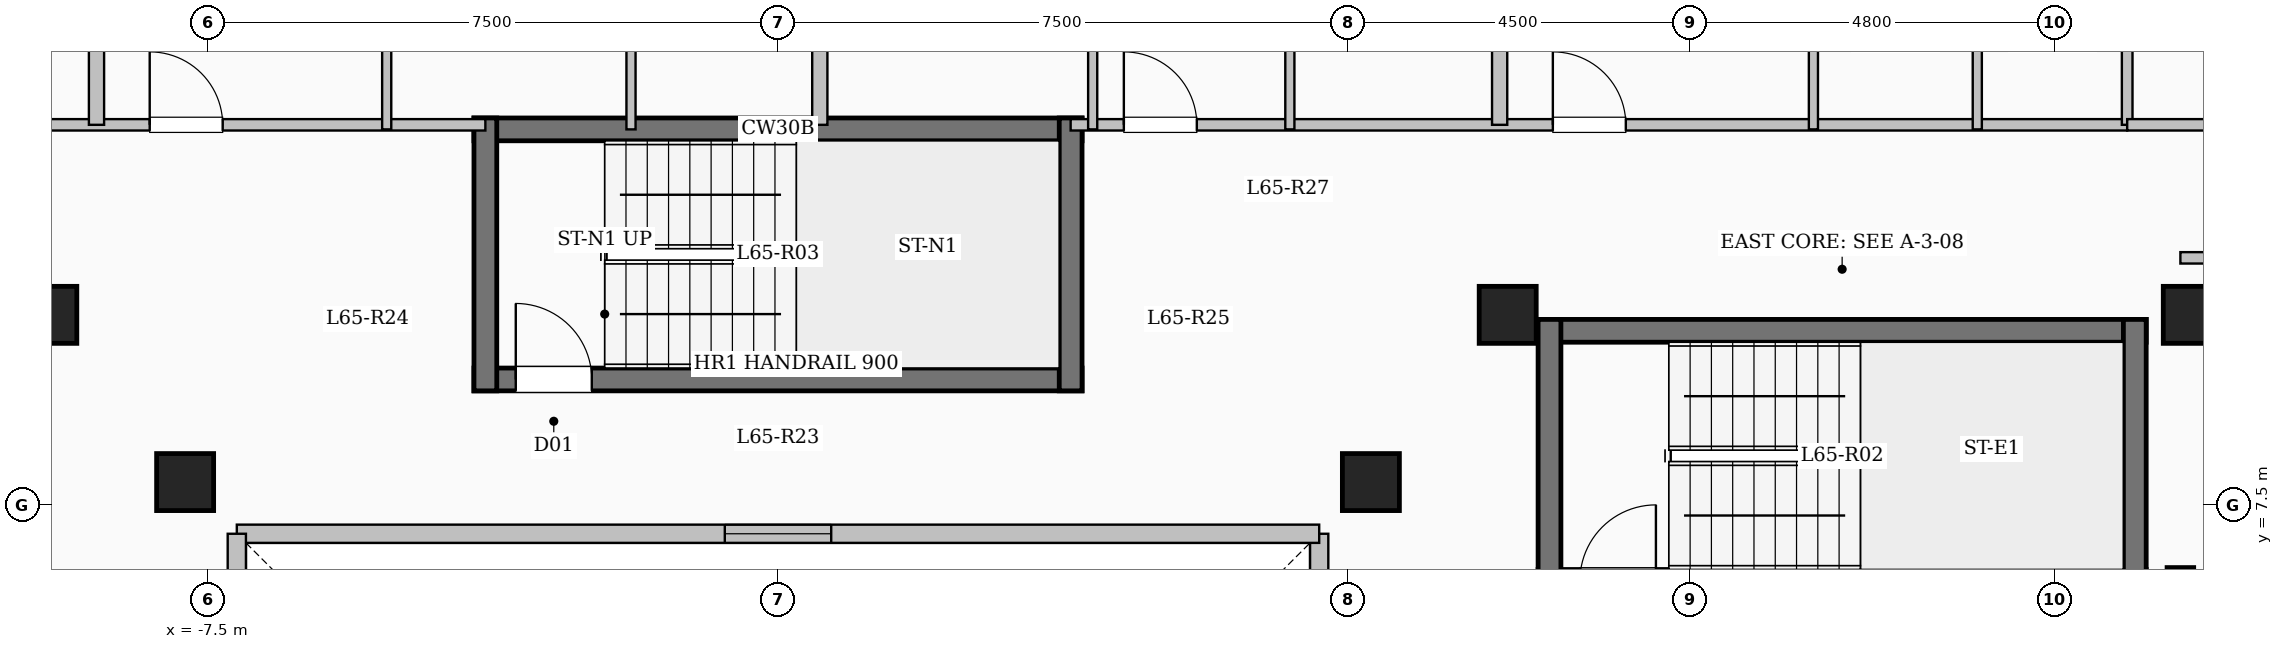
"""IFC4 building model, lengths in metres.
Left out: names, types, materials, properties, quantities, classifications, styles, units other than length and angle.
Written with IfcOpenShell. Run it as: python <this file> out.ifc"""

import sys

from ifc_helpers import new_model, si_unit, direction, frame, frame_2d, origin, origin_2d, place, context, subcontext, project, spatial, rectangle, extrude, element, fill, save


model = new_model("IFC4")
c1 = context("Model", 3, precision=1e-05, world=origin(), true_north=direction((0.0, 1.0)))
c2 = subcontext(c1, "Body", "Model", "MODEL_VIEW")
j1 = project(units=[si_unit("LENGTHUNIT", "METRE"), si_unit("PLANEANGLEUNIT", "RADIAN")], contexts=[c1])
p1 = place(None, origin())
s1 = spatial("IfcSite", under=j1, at=p1, CompositionType="ELEMENT")
p2 = place(p1, origin())
s2 = spatial("IfcBuilding", under=s1, at=p2, CompositionType="ELEMENT")
p3 = place(p2, frame((0.0, 0.0, 241.5)))
s3 = spatial("IfcBuildingStorey", under=s2, at=p3, CompositionType="ELEMENT", Elevation=241.5)
for number, where, z_axis, x_axis in (
    (1, (-7.8, 7.8, 0.0), (0.0, 0.0, 1.0), (1.0, 0.0, 0.0)),
    (2, (7.8, 7.8, 0.0), (0.0, 0.0, 1.0), (1.0, 0.0, 0.0)),
    (3, (-9.6, 10.0, 0.0), (0.0, 0.0, 1.0), (1.0, 0.0, 0.0)),
    (4, (9.6, 10.0, 0.0), (0.0, 0.0, 1.0), (1.0, 0.0, 0.0)),
    (5, (18.6, 10.0, 0.0), (0.0, 0.0, 1.0), (1.0, 0.0, 0.0)),
):
    element("IfcColumn", number, at=place(p3, frame(where, z_axis=z_axis, x_axis=x_axis)), inside=s3, PredefinedType="COLUMN", context=c2, shape_type="SweptSolid", body=[
        extrude(rectangle(XDim=0.75, YDim=0.75, at=origin_2d()), origin(), (0.0, 0.0, 1.0), 3.35),
    ])
p4 = place(p3, frame((7.12, -7.12, 0.0), z_axis=(0.0, 0.0, 1.0), x_axis=(0.0, 1.0, 0.0)))
e6 = element("IfcWall", 6, at=p4, inside=s3, PredefinedType="SOLIDWALL", context=c2, shape_type="SweptSolid", body=[
    extrude(rectangle(XDim=14.24, YDim=0.24, at=frame_2d((7.12, 0.0))), origin(), (0.0, 0.0, 1.0), 3.1),
])
p5 = place(p4, frame((6.42, 0.0, 0.95)))
e7 = element("IfcOpeningElement", 7, at=p5, cuts=e6, PredefinedType="OPENING", context=c2, shape_type="SweptSolid", body=[
    extrude(rectangle(XDim=1.4, YDim=1.5, at=frame_2d((0.7, 0.75))), frame((0.0, 0.13, 0.0), z_axis=(0.0, -1.0, 0.0), x_axis=(1.0, 0.0, 0.0)), (0.0, 0.0, 1.0), 0.26),
])
p6 = place(p3, frame((7.12, 7.12, 0.0), z_axis=(0.0, 0.0, 1.0), x_axis=(-1.0, 0.0, 0.0)))
e8 = element("IfcWall", 8, at=p6, inside=s3, PredefinedType="SOLIDWALL", context=c2, shape_type="SweptSolid", body=[
    extrude(rectangle(XDim=14.24, YDim=0.24, at=frame_2d((7.12, 0.0))), origin(), (0.0, 0.0, 1.0), 3.1),
])
p7 = place(p6, frame((6.42, 0.0, 0.95)))
e9 = element("IfcOpeningElement", 9, at=p7, cuts=e8, PredefinedType="OPENING", context=c2, shape_type="SweptSolid", body=[
    extrude(rectangle(XDim=1.4, YDim=1.5, at=frame_2d((0.7, 0.75))), frame((0.0, 0.13, 0.0), z_axis=(0.0, -1.0, 0.0), x_axis=(1.0, 0.0, 0.0)), (0.0, 0.0, 1.0), 0.26),
])
p8 = place(p3, frame((-7.12, 7.12, 0.0), z_axis=(0.0, 0.0, 1.0), x_axis=(0.0, -1.0, 0.0)))
e10 = element("IfcWall", 10, at=p8, inside=s3, PredefinedType="SOLIDWALL", context=c2, shape_type="SweptSolid", body=[
    extrude(rectangle(XDim=14.24, YDim=0.24, at=frame_2d((7.12, 0.0))), origin(), (0.0, 0.0, 1.0), 3.1),
])
p9 = place(p8, frame((6.42, 0.0, 0.95)))
e11 = element("IfcOpeningElement", 11, at=p9, cuts=e10, PredefinedType="OPENING", context=c2, shape_type="SweptSolid", body=[
    extrude(rectangle(XDim=1.4, YDim=1.5, at=frame_2d((0.7, 0.75))), frame((0.0, 0.13, 0.0), z_axis=(0.0, -1.0, 0.0), x_axis=(1.0, 0.0, 0.0)), (0.0, 0.0, 1.0), 0.26),
])
p10 = place(p3, frame((10.0, 9.79, 0.0), z_axis=(0.0, 0.0, 1.0), x_axis=(1.0, 0.0, 0.0)))
e12 = element("IfcWall", 12, at=p10, inside=s3, PredefinedType="SHEAR", context=c2, shape_type="SweptSolid", body=[
    extrude(rectangle(XDim=8.0, YDim=0.3, at=frame_2d((4.0, 0.0))), origin(), (0.0, 0.0, 1.0), 3.35),
])
p11 = place(p3, frame((10.0, 6.5, 0.0), z_axis=(0.0, 0.0, 1.0), x_axis=(1.0, 0.0, 0.0)))
e13 = element("IfcWall", 13, at=p11, inside=s3, PredefinedType="SHEAR", context=c2, shape_type="SweptSolid", body=[
    extrude(rectangle(XDim=8.0, YDim=0.3, at=frame_2d((4.0, 0.0))), origin(), (0.0, 0.0, 1.0), 3.35),
])
p12 = place(p11, frame((0.55, 0.0, 0.0)))
e14 = element("IfcOpeningElement", 14, at=p12, cuts=e13, PredefinedType="OPENING", context=c2, shape_type="SweptSolid", body=[
    extrude(rectangle(XDim=1.0, YDim=2.15, at=frame_2d((0.5, 1.075))), frame((0.0, 0.16, 0.0), z_axis=(0.0, -1.0, 0.0), x_axis=(1.0, 0.0, 0.0)), (0.0, 0.0, 1.0), 0.32),
])
for number, where, z_axis, x_axis in (
    (15, (10.15, 6.35, 0.0), (0.0, 0.0, 1.0), (0.0, 1.0, 0.0)),
    (16, (17.85, 6.35, 0.0), (0.0, 0.0, 1.0), (0.0, 1.0, 0.0)),
):
    element("IfcWall", number, at=place(p3, frame(where, z_axis=z_axis, x_axis=x_axis)), inside=s3, PredefinedType="SHEAR", context=c2, shape_type="SweptSolid", body=[
        extrude(rectangle(XDim=3.59, YDim=0.3, at=frame_2d((1.795, 0.0))), origin(), (0.0, 0.0, 1.0), 3.35),
    ])
p13 = place(p3, frame((-4.0, 12.44, 0.0), z_axis=(0.0, 0.0, 1.0), x_axis=(1.0, 0.0, 0.0)))
e17 = element("IfcWall", 17, at=p13, inside=s3, PredefinedType="SHEAR", context=c2, shape_type="SweptSolid", body=[
    extrude(rectangle(XDim=8.0, YDim=0.3, at=frame_2d((4.0, 0.0))), origin(), (0.0, 0.0, 1.0), 3.35),
])
p14 = place(p3, frame((-4.0, 9.15, 0.0), z_axis=(0.0, 0.0, 1.0), x_axis=(1.0, 0.0, 0.0)))
e18 = element("IfcWall", 18, at=p14, inside=s3, PredefinedType="SHEAR", context=c2, shape_type="SweptSolid", body=[
    extrude(rectangle(XDim=8.0, YDim=0.3, at=frame_2d((4.0, 0.0))), origin(), (0.0, 0.0, 1.0), 3.35),
])
p15 = place(p14, frame((0.55, 0.0, 0.0)))
e19 = element("IfcOpeningElement", 19, at=p15, cuts=e18, PredefinedType="OPENING", context=c2, shape_type="SweptSolid", body=[
    extrude(rectangle(XDim=1.0, YDim=2.15, at=frame_2d((0.5, 1.075))), frame((0.0, 0.16, 0.0), z_axis=(0.0, -1.0, 0.0), x_axis=(1.0, 0.0, 0.0)), (0.0, 0.0, 1.0), 0.32),
])
for number, where, z_axis, x_axis in (
    (20, (-3.85, 9.0, 0.0), (0.0, 0.0, 1.0), (0.0, 1.0, 0.0)),
    (21, (3.85, 9.0, 0.0), (0.0, 0.0, 1.0), (0.0, 1.0, 0.0)),
):
    element("IfcWall", number, at=place(p3, frame(where, z_axis=z_axis, x_axis=x_axis)), inside=s3, PredefinedType="SHEAR", context=c2, shape_type="SweptSolid", body=[
        extrude(rectangle(XDim=3.59, YDim=0.3, at=frame_2d((1.795, 0.0))), origin(), (0.0, 0.0, 1.0), 3.35),
    ])
p16 = place(p3, frame((18.45, -7.375, 0.0), z_axis=(0.0, 0.0, 1.0), x_axis=(0.0, 1.0, 0.0)))
e22 = element("IfcWall", 22, at=p16, inside=s3, PredefinedType="SHEAR", context=c2, shape_type="SweptSolid", body=[
    extrude(rectangle(XDim=14.05, YDim=0.35, at=frame_2d((7.025, 0.0))), origin(), (0.0, 0.0, 1.0), 3.35),
])
p17 = place(p3, frame((-17.75, 12.5, 0.0), z_axis=(0.0, 0.0, 1.0), x_axis=(1.0, 0.0, 0.0)))
e23 = element("IfcWall", 23, at=p17, inside=s3, PredefinedType="PARTITIONING", context=c2, shape_type="SweptSolid", body=[
    extrude(rectangle(XDim=13.9, YDim=0.15, at=frame_2d((6.95, 0.0))), origin(), (0.0, 0.0, 1.0), 3.1),
])
p18 = place(p17, frame((0.7, 0.0, 0.0)))
e24 = element("IfcOpeningElement", 24, at=p18, cuts=e23, PredefinedType="OPENING", context=c2, shape_type="SweptSolid", body=[
    extrude(rectangle(XDim=0.96, YDim=2.15, at=frame_2d((0.48, 1.075))), frame((0.0, 0.085, 0.0), z_axis=(0.0, -1.0, 0.0), x_axis=(1.0, 0.0, 0.0)), (0.0, 0.0, 1.0), 0.17),
])
p19 = place(p17, frame((9.484, 0.0, 0.0)))
e25 = element("IfcOpeningElement", 25, at=p19, cuts=e23, PredefinedType="OPENING", context=c2, shape_type="SweptSolid", body=[
    extrude(rectangle(XDim=0.96, YDim=2.15, at=frame_2d((0.48, 1.075))), frame((0.0, 0.085, 0.0), z_axis=(0.0, -1.0, 0.0), x_axis=(1.0, 0.0, 0.0)), (0.0, 0.0, 1.0), 0.17),
])
p20 = place(p3, frame((3.85, 12.5, 0.0), z_axis=(0.0, 0.0, 1.0), x_axis=(1.0, 0.0, 0.0)))
e26 = element("IfcWall", 26, at=p20, inside=s3, PredefinedType="PARTITIONING", context=c2, shape_type="SweptSolid", body=[
    extrude(rectangle(XDim=13.9, YDim=0.15, at=frame_2d((6.95, 0.0))), origin(), (0.0, 0.0, 1.0), 3.1),
])
p21 = place(p20, frame((0.7, 0.0, 0.0)))
e27 = element("IfcOpeningElement", 27, at=p21, cuts=e26, PredefinedType="OPENING", context=c2, shape_type="SweptSolid", body=[
    extrude(rectangle(XDim=0.96, YDim=2.15, at=frame_2d((0.48, 1.075))), frame((0.0, 0.085, 0.0), z_axis=(0.0, -1.0, 0.0), x_axis=(1.0, 0.0, 0.0)), (0.0, 0.0, 1.0), 0.17),
])
p22 = place(p20, frame((6.344, 0.0, 0.0)))
e28 = element("IfcOpeningElement", 28, at=p22, cuts=e26, PredefinedType="OPENING", context=c2, shape_type="SweptSolid", body=[
    extrude(rectangle(XDim=0.96, YDim=2.15, at=frame_2d((0.48, 1.075))), frame((0.0, 0.085, 0.0), z_axis=(0.0, -1.0, 0.0), x_axis=(1.0, 0.0, 0.0)), (0.0, 0.0, 1.0), 0.17),
])
p23 = place(p3, frame((0.55, 12.5, 0.0), z_axis=(0.0, 0.0, 1.0), x_axis=(0.0, 1.0, 0.0)))
e29 = element("IfcWall", 29, at=p23, inside=s3, PredefinedType="SOLIDWALL", context=c2, shape_type="SweptSolid", body=[
    extrude(rectangle(XDim=9.88, YDim=0.2, at=frame_2d((4.94, 0.0))), origin(), (0.0, 0.0, 1.0), 3.1),
])
p24 = place(p3, frame((-8.966, 12.5, 0.0), z_axis=(0.0, 0.0, 1.0), x_axis=(0.0, 1.0, 0.0)))
e30 = element("IfcWall", 30, at=p24, inside=s3, PredefinedType="SOLIDWALL", context=c2, shape_type="SweptSolid", body=[
    extrude(rectangle(XDim=8.902, YDim=0.2, at=frame_2d((4.451, 0.0))), origin(), (0.0, 0.0, 1.0), 3.1),
])
p25 = place(p3, frame((-5.148, 12.44, 0.0), z_axis=(0.0, 0.0, 1.0), x_axis=(0.0, 1.0, 0.0)))
e31 = element("IfcWall", 31, at=p25, inside=s3, PredefinedType="PARTITIONING", context=c2, shape_type="SweptSolid", body=[
    extrude(rectangle(XDim=9.903, YDim=0.12, at=frame_2d((4.952, 0.0))), origin(), (0.0, 0.0, 1.0), 3.1),
])
p26 = place(p25, frame((3.075, 0.0, 0.0)))
e32 = element("IfcOpeningElement", 32, at=p26, cuts=e31, PredefinedType="OPENING", context=c2, shape_type="SweptSolid", body=[
    extrude(rectangle(XDim=1.08, YDim=2.15, at=frame_2d((0.54, 1.075))), frame((0.0, 0.07, 0.0), z_axis=(0.0, -1.0, 0.0), x_axis=(1.0, 0.0, 0.0)), (0.0, 0.0, 1.0), 0.14),
])
p27 = place(p3, frame((-1.934, 12.44, 0.0), z_axis=(0.0, 0.0, 1.0), x_axis=(0.0, 1.0, 0.0)))
e33 = element("IfcWall", 33, at=p27, inside=s3, PredefinedType="PARTITIONING", context=c2, shape_type="SweptSolid", body=[
    extrude(rectangle(XDim=2.79, YDim=0.12, at=frame_2d((1.395, 0.0))), origin(), (0.0, 0.0, 1.0), 3.1),
])
p28 = place(p3, frame((9.494, 12.5, 0.0), z_axis=(0.0, 0.0, 1.0), x_axis=(0.0, 1.0, 0.0)))
e34 = element("IfcWall", 34, at=p28, inside=s3, PredefinedType="SOLIDWALL", context=c2, shape_type="SweptSolid", body=[
    extrude(rectangle(XDim=8.771, YDim=0.2, at=frame_2d((4.385, 0.0))), origin(), (0.0, 0.0, 1.0), 3.1),
])
p29 = place(p3, frame((4.14, 12.44, 0.0), z_axis=(0.0, 0.0, 1.0), x_axis=(0.0, 1.0, 0.0)))
e35 = element("IfcWall", 35, at=p29, inside=s3, PredefinedType="PARTITIONING", context=c2, shape_type="SweptSolid", body=[
    extrude(rectangle(XDim=9.94, YDim=0.12, at=frame_2d((4.97, 0.0))), origin(), (0.0, 0.0, 1.0), 3.1),
])
p30 = place(p29, frame((3.245, 0.0, 0.0)))
e36 = element("IfcOpeningElement", 36, at=p30, cuts=e35, PredefinedType="OPENING", context=c2, shape_type="SweptSolid", body=[
    extrude(rectangle(XDim=1.08, YDim=2.15, at=frame_2d((0.54, 1.075))), frame((0.0, 0.07, 0.0), z_axis=(0.0, -1.0, 0.0), x_axis=(1.0, 0.0, 0.0)), (0.0, 0.0, 1.0), 0.14),
])
p31 = place(p3, frame((6.734, 12.44, 0.0), z_axis=(0.0, 0.0, 1.0), x_axis=(0.0, 1.0, 0.0)))
e37 = element("IfcWall", 37, at=p31, inside=s3, PredefinedType="PARTITIONING", context=c2, shape_type="SweptSolid", body=[
    extrude(rectangle(XDim=2.96, YDim=0.12, at=frame_2d((1.48, 0.0))), origin(), (0.0, 0.0, 1.0), 3.1),
])
p32 = place(p3, frame((13.622, 12.44, 0.0), z_axis=(0.0, 0.0, 1.0), x_axis=(0.0, 1.0, 0.0)))
e38 = element("IfcWall", 38, at=p32, inside=s3, PredefinedType="PARTITIONING", context=c2, shape_type="SweptSolid", body=[
    extrude(rectangle(XDim=8.46, YDim=0.12, at=frame_2d((4.23, 0.0))), origin(), (0.0, 0.0, 1.0), 3.1),
])
p33 = place(p32, frame((2.735, 0.0, 0.0)))
e39 = element("IfcOpeningElement", 39, at=p33, cuts=e38, PredefinedType="OPENING", context=c2, shape_type="SweptSolid", body=[
    extrude(rectangle(XDim=1.08, YDim=2.15, at=frame_2d((0.54, 1.075))), frame((0.0, 0.07, 0.0), z_axis=(0.0, -1.0, 0.0), x_axis=(1.0, 0.0, 0.0)), (0.0, 0.0, 1.0), 0.14),
])
p34 = place(p3, frame((15.778, 12.44, 0.0), z_axis=(0.0, 0.0, 1.0), x_axis=(0.0, 1.0, 0.0)))
e40 = element("IfcWall", 40, at=p34, inside=s3, PredefinedType="PARTITIONING", context=c2, shape_type="SweptSolid", body=[
    extrude(rectangle(XDim=2.45, YDim=0.12, at=frame_2d((1.225, 0.0))), origin(), (0.0, 0.0, 1.0), 3.1),
])
p35 = place(p3, frame((18.45, 10.75, 0.0), z_axis=(0.0, 0.0, 1.0), x_axis=(1.0, 0.0, 0.0)))
e41 = element("IfcWall", 41, at=p35, inside=s3, PredefinedType="PARTITIONING", context=c2, shape_type="SweptSolid", body=[
    extrude(rectangle(XDim=4.23, YDim=0.15, at=frame_2d((2.115, 0.0))), origin(), (0.0, 0.0, 1.0), 3.1),
])
p36 = place(p3, frame((17.75, 12.5, 0.0), z_axis=(0.0, 0.0, 1.0), x_axis=(0.0, 1.0, 0.0)))
e42 = element("IfcWall", 42, at=p36, inside=s3, PredefinedType="PARTITIONING", context=c2, shape_type="SweptSolid", body=[
    extrude(rectangle(XDim=5.05, YDim=0.14, at=frame_2d((2.525, 0.0))), origin(), (0.0, 0.0, 1.0), 3.1),
])
p37 = place(p3, frame((17.75, 12.5, 0.0), z_axis=(0.0, 0.0, 1.0), x_axis=(1.0, 0.0, 0.0)))
e43 = element("IfcWall", 43, at=p37, inside=s3, PredefinedType="PARTITIONING", context=c2, shape_type="SweptSolid", body=[
    extrude(rectangle(XDim=4.93, YDim=0.15, at=frame_2d((2.465, 0.0))), origin(), (0.0, 0.0, 1.0), 3.1),
])
p38 = place(p37, frame((1.99, 0.0, 0.0)))
e44 = element("IfcOpeningElement", 44, at=p38, cuts=e43, PredefinedType="OPENING", context=c2, shape_type="SweptSolid", body=[
    extrude(rectangle(XDim=0.95, YDim=2.15, at=frame_2d((0.475, 1.075))), frame((0.0, 0.085, 0.0), z_axis=(0.0, -1.0, 0.0), x_axis=(1.0, 0.0, 0.0)), (0.0, 0.0, 1.0), 0.17),
])
p39 = place(p7, origin())
e45 = element("IfcWindow", 45, at=p39, inside=s3, PartitioningType="SINGLE_PANEL", PredefinedType="WINDOW", context=c2, shape_type="SweptSolid", body=[
    extrude(rectangle(XDim=1.4, YDim=1.5, at=frame_2d((0.7, 0.75))), frame((0.0, 0.03, 0.0), z_axis=(0.0, -1.0, 0.0), x_axis=(1.0, 0.0, 0.0)), (0.0, 0.0, 1.0), 0.06),
])
fill(e9, e45)
p40 = place(p15, origin())
e46 = element("IfcDoor", 46, at=p40, inside=s3, OperationType="SINGLE_SWING_LEFT", PredefinedType="DOOR", context=c2, shape_type="SweptSolid", body=[
    extrude(rectangle(XDim=1.0, YDim=2.15, at=frame_2d((0.5, 1.075))), frame((0.0, 0.025, 0.0), z_axis=(0.0, -1.0, 0.0), x_axis=(1.0, 0.0, 0.0)), (0.0, 0.0, 1.0), 0.05),
])
fill(e19, e46)
p41 = place(p19, origin())
e47 = element("IfcDoor", 47, at=p41, inside=s3, OperationType="SINGLE_SWING_LEFT", PredefinedType="DOOR", context=c2, shape_type="SweptSolid", body=[
    extrude(rectangle(XDim=0.96, YDim=2.15, at=frame_2d((0.48, 1.075))), frame((0.0, 0.025, 0.0), z_axis=(0.0, -1.0, 0.0), x_axis=(1.0, 0.0, 0.0)), (0.0, 0.0, 1.0), 0.05),
])
fill(e25, e47)
p42 = place(p21, origin())
e48 = element("IfcDoor", 48, at=p42, inside=s3, OperationType="SINGLE_SWING_LEFT", PredefinedType="DOOR", context=c2, shape_type="SweptSolid", body=[
    extrude(rectangle(XDim=0.96, YDim=2.15, at=frame_2d((0.48, 1.075))), frame((0.0, 0.025, 0.0), z_axis=(0.0, -1.0, 0.0), x_axis=(1.0, 0.0, 0.0)), (0.0, 0.0, 1.0), 0.05),
])
fill(e27, e48)
p43 = place(p22, origin())
e49 = element("IfcDoor", 49, at=p43, inside=s3, OperationType="SINGLE_SWING_LEFT", PredefinedType="DOOR", context=c2, shape_type="SweptSolid", body=[
    extrude(rectangle(XDim=0.96, YDim=2.15, at=frame_2d((0.48, 1.075))), frame((0.0, 0.025, 0.0), z_axis=(0.0, -1.0, 0.0), x_axis=(1.0, 0.0, 0.0)), (0.0, 0.0, 1.0), 0.05),
])
fill(e28, e49)
save(model, sys.argv[1])
